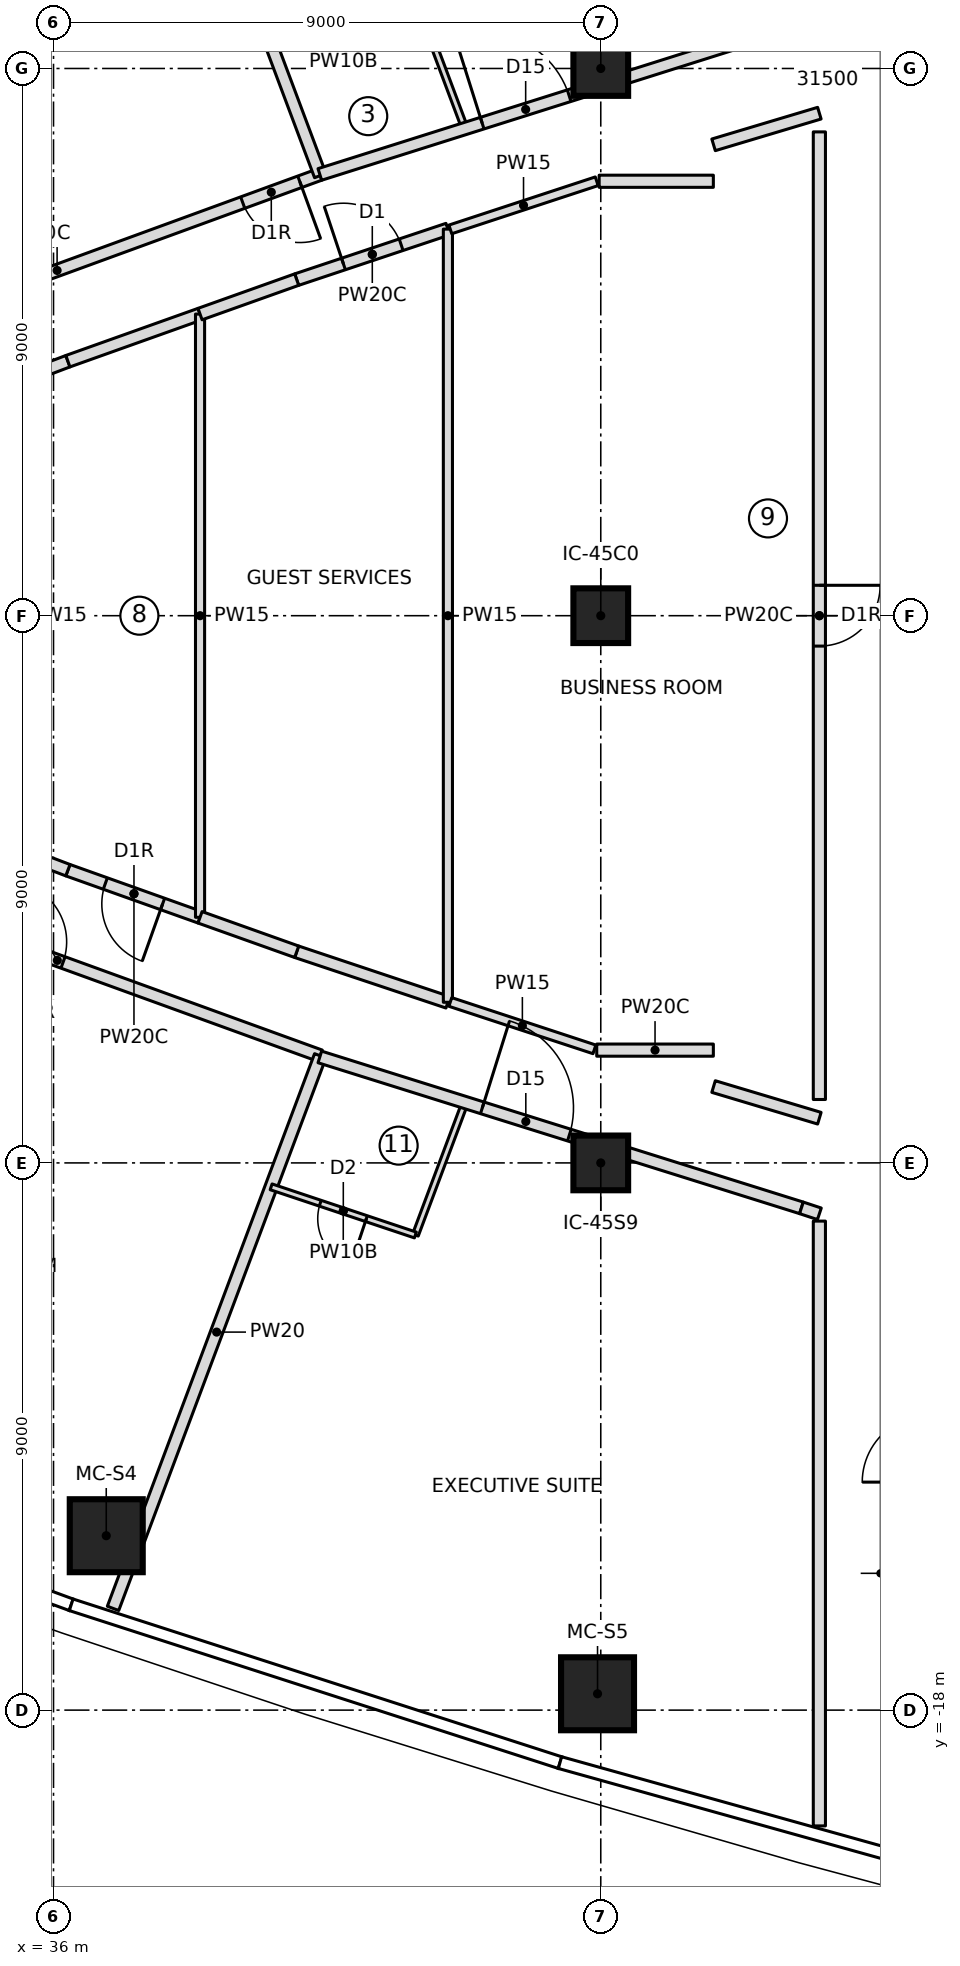
"""IFC4 building model, lengths in metres.
Left out: names, types, materials, properties, quantities, classifications, styles, units other than length and angle.
Written with IfcOpenShell. Run it as: python <this file> out.ifc"""

import sys

from ifc_helpers import new_model, si_unit, direction, frame, frame_2d, origin, origin_2d, place, context, subcontext, project, spatial, rectangle, extrude, element, fill, save


model = new_model("IFC4")
c1 = context("Model", 3, precision=1e-05, world=origin(), true_north=direction((0.0, 1.0)))
c2 = subcontext(c1, "Body", "Model", "MODEL_VIEW")
j1 = project(units=[si_unit("LENGTHUNIT", "METRE"), si_unit("PLANEANGLEUNIT", "RADIAN")], contexts=[c1])
p1 = place(None, origin())
s1 = spatial("IfcSite", under=j1, at=p1, CompositionType="ELEMENT")
p2 = place(p1, origin())
s2 = spatial("IfcBuilding", under=s1, at=p2, CompositionType="ELEMENT")
p3 = place(p2, frame((0.0, 0.0, 238.55)))
s3 = spatial("IfcBuildingStorey", under=s2, at=p3, CompositionType="ELEMENT", Elevation=238.55)
for number, where, z_axis, x_axis in (
    (1, (36.867, -15.132, 0.0), (0.0, 0.0, 1.0), (1.0, 0.0, 0.0)),
    (2, (44.947, -17.731, 0.0), (0.0, 0.0, 1.0), (1.0, 0.0, 0.0)),
):
    element("IfcColumn", number, at=place(p3, frame(where, z_axis=z_axis, x_axis=x_axis)), inside=s3, PredefinedType="COLUMN", context=c2, shape_type="SweptSolid", body=[
        extrude(rectangle(XDim=1.2, YDim=1.2, at=origin_2d()), origin(), (0.0, 0.0, 1.0), 3.55),
    ])
for number, where, z_axis, x_axis in (
    (3, (45.0, -9.0, 0.0), (0.0, 0.0, 1.0), (1.0, 0.0, 0.0)),
    (4, (45.0, 0.0, 0.0), (0.0, 0.0, 1.0), (1.0, 0.0, 0.0)),
    (5, (45.0, 9.0, 0.0), (0.0, 0.0, 1.0), (1.0, 0.0, 0.0)),
):
    element("IfcColumn", number, at=place(p3, frame(where, z_axis=z_axis, x_axis=x_axis)), inside=s3, PredefinedType="COLUMN", context=c2, shape_type="SweptSolid", body=[
        extrude(rectangle(XDim=0.9, YDim=0.9, at=origin_2d()), origin(), (0.0, 0.0, 1.0), 3.55),
    ])
p4 = place(p3, frame((40.38, 7.257, 0.0), z_axis=(0.0, 0.0, 1.0), x_axis=(-0.939266239759, -0.343189351305, 0.0)))
e6 = element("IfcWall", 6, at=p4, inside=s3, PredefinedType="PARTITIONING", context=c2, shape_type="SweptSolid", body=[
    extrude(rectangle(XDim=9.2, YDim=0.2, at=frame_2d((4.6, 0.0))), origin(), (0.0, 0.0, 1.0), 3.25),
])
p5 = place(p4, frame((0.35, 0.0, 0.0)))
e7 = element("IfcOpeningElement", 7, at=p5, cuts=e6, PredefinedType="OPENING", context=c2, shape_type="SweptSolid", body=[
    extrude(rectangle(XDim=1.0, YDim=2.1, at=frame_2d((0.5, 1.05))), frame((0.0, 0.11, 0.0), z_axis=(0.0, -1.0, 0.0), x_axis=(1.0, 0.0, 0.0)), (0.0, 0.0, 1.0), 0.22),
])
p6 = place(p3, frame((40.387, 7.238, 0.0), z_axis=(0.0, 0.0, 1.0), x_axis=(-0.351098633881, 0.936338480084, 0.0)))
e8 = element("IfcWall", 8, at=p6, inside=s3, PredefinedType="PARTITIONING", context=c2, shape_type="SweptSolid", body=[
    extrude(rectangle(XDim=9.707, YDim=0.2, at=frame_2d((4.853, 0.0))), origin(), (0.0, 0.0, 1.0), 3.25),
])
p7 = place(p3, frame((41.951, 10.186, 0.0), z_axis=(0.0, 0.0, 1.0), x_axis=(0.351146927505, -0.936320370014, 0.0)))
e9 = element("IfcWall", 9, at=p7, inside=s3, PredefinedType="PARTITIONING", context=c2, shape_type="SweptSolid", body=[
    extrude(rectangle(XDim=2.278, YDim=0.1, at=frame_2d((1.139, 0.0))), origin(), (0.0, 0.0, 1.0), 3.25),
])
p8 = place(p3, frame((31.738, -4.1, 0.0), z_axis=(0.0, 0.0, 1.0), x_axis=(0.940010170527, -0.341146419159, 0.0)))
e10 = element("IfcWall", 10, at=p8, inside=s3, PredefinedType="PARTITIONING", context=c2, shape_type="SweptSolid", body=[
    extrude(rectangle(XDim=9.2, YDim=0.2, at=frame_2d((4.6, 0.0))), origin(), (0.0, 0.0, 1.0), 3.25),
])
p9 = place(p8, frame((3.7, 0.0, 0.0)))
e11 = element("IfcOpeningElement", 11, at=p9, cuts=e10, PredefinedType="OPENING", context=c2, shape_type="SweptSolid", body=[
    extrude(rectangle(XDim=1.0, YDim=2.1, at=frame_2d((0.5, 1.05))), frame((0.0, 0.11, 0.0), z_axis=(0.0, -1.0, 0.0), x_axis=(1.0, 0.0, 0.0)), (0.0, 0.0, 1.0), 0.22),
])
p10 = place(p3, frame((36.979, -16.327, 0.0), z_axis=(0.0, 0.0, 1.0), x_axis=(0.351098633881, 0.936338480084, 0.0)))
e12 = element("IfcWall", 12, at=p10, inside=s3, PredefinedType="PARTITIONING", context=c2, shape_type="SweptSolid", body=[
    extrude(rectangle(XDim=9.707, YDim=0.2, at=frame_2d((4.853, 0.0))), origin(), (0.0, 0.0, 1.0), 3.25),
])
p11 = place(p3, frame((42.751, -8.052, 0.0), z_axis=(0.0, 0.0, 1.0), x_axis=(-0.351146927505, -0.936320370014, 0.0)))
e13 = element("IfcWall", 13, at=p11, inside=s3, PredefinedType="PARTITIONING", context=c2, shape_type="SweptSolid", body=[
    extrude(rectangle(XDim=2.278, YDim=0.1, at=frame_2d((1.139, 0.0))), origin(), (0.0, 0.0, 1.0), 3.25),
])
p12 = place(p3, frame((41.951, -10.186, 0.0), z_axis=(0.0, 0.0, 1.0), x_axis=(-0.948468383404, 0.316871781141, 0.0)))
e14 = element("IfcWall", 14, at=p12, inside=s3, PredefinedType="PARTITIONING", context=c2, shape_type="SweptSolid", body=[
    extrude(rectangle(XDim=2.502, YDim=0.1, at=frame_2d((1.251, 0.0))), origin(), (0.0, 0.0, 1.0), 3.25),
])
p13 = place(p12, frame((0.85, 0.0, 0.0)))
e15 = element("IfcOpeningElement", 15, at=p13, cuts=e14, PredefinedType="OPENING", context=c2, shape_type="SweptSolid", body=[
    extrude(rectangle(XDim=0.8, YDim=2.1, at=frame_2d((0.4, 1.05))), frame((0.0, 0.06, 0.0), z_axis=(0.0, -1.0, 0.0), x_axis=(1.0, 0.0, 0.0)), (0.0, 0.0, 1.0), 0.12),
])
p14 = place(p3, frame((38.41, -4.961, 0.0), z_axis=(0.0, 0.0, 1.0), x_axis=(-0.941897392466, 0.335900732459, 0.0)))
e16 = element("IfcWall", 16, at=p14, inside=s3, PredefinedType="PARTITIONING", context=c2, shape_type="SweptSolid", body=[
    extrude(rectangle(XDim=2.308, YDim=0.2, at=frame_2d((1.154, 0.0))), origin(), (0.0, 0.0, 1.0), 3.25),
])
p15 = place(p14, frame((0.654, 0.0, 0.0)))
e17 = element("IfcOpeningElement", 17, at=p15, cuts=e16, PredefinedType="OPENING", context=c2, shape_type="SweptSolid", body=[
    extrude(rectangle(XDim=1.0, YDim=2.1, at=frame_2d((0.5, 1.05))), frame((0.0, 0.11, 0.0), z_axis=(0.0, -1.0, 0.0), x_axis=(1.0, 0.0, 0.0)), (0.0, 0.0, 1.0), 0.22),
])
for number, where, z_axis, x_axis in (
    (18, (36.236, -4.186, 0.0), (0.0, 0.0, 1.0), (-0.935, 0.355, 0.0)),
    (19, (35.41, 3.872, 0.0), (0.0, 0.0, 1.0), (0.935, 0.355, 0.0)),
):
    element("IfcWall", number, at=place(p3, frame(where, z_axis=z_axis, x_axis=x_axis)), inside=s3, PredefinedType="PARTITIONING", context=c2, shape_type="SweptSolid", body=[
        extrude(rectangle(XDim=0.884, YDim=0.2, at=frame_2d((0.442, 0.0))), origin(), (0.0, 0.0, 1.0), 3.25),
    ])
p16 = place(p3, frame((36.236, 4.186, 0.0), z_axis=(0.0, 0.0, 1.0), x_axis=(0.941897392466, 0.335900732459, 0.0)))
e20 = element("IfcWall", 20, at=p16, inside=s3, PredefinedType="PARTITIONING", context=c2, shape_type="SweptSolid", body=[
    extrude(rectangle(XDim=2.308, YDim=0.2, at=frame_2d((1.154, 0.0))), origin(), (0.0, 0.0, 1.0), 3.25),
])
p17 = place(p3, frame((38.41, -4.961, 0.0), z_axis=(0.0, 0.0, 1.0), x_axis=(0.0, 1.0, 0.0)))
e21 = element("IfcWall", 21, at=p17, inside=s3, PredefinedType="PARTITIONING", context=c2, shape_type="SweptSolid", body=[
    extrude(rectangle(XDim=9.921, YDim=0.15, at=frame_2d((4.961, 0.0))), origin(), (0.0, 0.0, 1.0), 3.25),
])
p18 = place(p3, frame((39.999, 5.527, 0.0), z_axis=(0.0, 0.0, 1.0), x_axis=(0.948459565489, 0.316898173918, 0.0)))
e22 = element("IfcWall", 22, at=p18, inside=s3, PredefinedType="PARTITIONING", context=c2, shape_type="SweptSolid", body=[
    extrude(rectangle(XDim=2.622, YDim=0.2, at=frame_2d((1.311, 0.0))), origin(), (0.0, 0.0, 1.0), 3.25),
])
p19 = place(p18, frame((0.811, 0.0, 0.0)))
e23 = element("IfcOpeningElement", 23, at=p19, cuts=e22, PredefinedType="OPENING", context=c2, shape_type="SweptSolid", body=[
    extrude(rectangle(XDim=1.0, YDim=2.1, at=frame_2d((0.5, 1.05))), frame((0.0, 0.11, 0.0), z_axis=(0.0, -1.0, 0.0), x_axis=(1.0, 0.0, 0.0)), (0.0, 0.0, 1.0), 0.22),
])
p20 = place(p3, frame((42.486, -6.358, 0.0), z_axis=(0.0, 0.0, 1.0), x_axis=(-0.948459565489, 0.316898173918, 0.0)))
e24 = element("IfcWall", 24, at=p20, inside=s3, PredefinedType="PARTITIONING", context=c2, shape_type="SweptSolid", body=[
    extrude(rectangle(XDim=2.622, YDim=0.2, at=frame_2d((1.311, 0.0))), origin(), (0.0, 0.0, 1.0), 3.25),
])
for number, where, z_axis, x_axis in (
    (25, (39.999, -5.527, 0.0), (0.0, 0.0, 1.0), (-0.942, 0.336, 0.0)),
    (26, (38.41, 4.961, 0.0), (0.0, 0.0, 1.0), (0.942, 0.336, 0.0)),
):
    element("IfcWall", number, at=place(p3, frame(where, z_axis=z_axis, x_axis=x_axis)), inside=s3, PredefinedType="PARTITIONING", context=c2, shape_type="SweptSolid", body=[
        extrude(rectangle(XDim=1.687, YDim=0.2, at=frame_2d((0.844, 0.0))), origin(), (0.0, 0.0, 1.0), 3.25),
    ])
p21 = place(p3, frame((42.486, -6.358, 0.0), z_axis=(0.0, 0.0, 1.0), x_axis=(0.0, 1.0, 0.0)))
e27 = element("IfcWall", 27, at=p21, inside=s3, PredefinedType="PARTITIONING", context=c2, shape_type="SweptSolid", body=[
    extrude(rectangle(XDim=12.716, YDim=0.15, at=frame_2d((6.358, 0.0))), origin(), (0.0, 0.0, 1.0), 3.25),
])
p22 = place(p3, frame((40.38, 7.257, 0.0), z_axis=(0.0, 0.0, 1.0), x_axis=(0.953536454425, 0.301277662768, 0.0)))
e28 = element("IfcWall", 28, at=p22, inside=s3, PredefinedType="PARTITIONING", context=c2, shape_type="SweptSolid", body=[
    extrude(rectangle(XDim=8.306, YDim=0.2, at=frame_2d((4.153, 0.0))), origin(), (0.0, 0.0, 1.0), 3.25),
])
p23 = place(p22, frame((2.8, 0.0, 0.0)))
e29 = element("IfcOpeningElement", 29, at=p23, cuts=e28, PredefinedType="OPENING", context=c2, shape_type="SweptSolid", body=[
    extrude(rectangle(XDim=1.5, YDim=2.1, at=frame_2d((0.75, 1.05))), frame((0.0, 0.11, 0.0), z_axis=(0.0, -1.0, 0.0), x_axis=(1.0, 0.0, 0.0)), (0.0, 0.0, 1.0), 0.22),
])
p24 = place(p3, frame((40.38, -7.257, 0.0), z_axis=(0.0, 0.0, 1.0), x_axis=(0.954235234728, -0.299057046068, 0.0)))
e30 = element("IfcWall", 30, at=p24, inside=s3, PredefinedType="PARTITIONING", context=c2, shape_type="SweptSolid", body=[
    extrude(rectangle(XDim=8.3, YDim=0.2, at=frame_2d((4.15, 0.0))), origin(), (0.0, 0.0, 1.0), 3.25),
])
p25 = place(p24, frame((2.8, 0.0, 0.0)))
e31 = element("IfcOpeningElement", 31, at=p25, cuts=e30, PredefinedType="OPENING", context=c2, shape_type="SweptSolid", body=[
    extrude(rectangle(XDim=1.5, YDim=2.1, at=frame_2d((0.75, 1.05))), frame((0.0, 0.11, 0.0), z_axis=(0.0, -1.0, 0.0), x_axis=(1.0, 0.0, 0.0)), (0.0, 0.0, 1.0), 0.22),
])
p26 = place(p3, frame((48.595, 7.957, 0.0), z_axis=(0.0, 0.0, 1.0), x_axis=(0.0, -1.0, 0.0)))
e32 = element("IfcWall", 32, at=p26, inside=s3, PredefinedType="PARTITIONING", context=c2, shape_type="SweptSolid", body=[
    extrude(rectangle(XDim=15.914, YDim=0.2, at=frame_2d((7.957, 0.0))), origin(), (0.0, 0.0, 1.0), 3.25),
])
p27 = place(p26, frame((7.457, 0.0, 0.0)))
e33 = element("IfcOpeningElement", 33, at=p27, cuts=e32, PredefinedType="OPENING", context=c2, shape_type="SweptSolid", body=[
    extrude(rectangle(XDim=1.0, YDim=2.1, at=frame_2d((0.5, 1.05))), frame((0.0, 0.11, 0.0), z_axis=(0.0, -1.0, 0.0), x_axis=(1.0, 0.0, 0.0)), (0.0, 0.0, 1.0), 0.22),
])
p28 = place(p3, frame((42.526, 6.353, 0.0), z_axis=(0.0, 0.0, 1.0), x_axis=(0.949956634582, 0.312381805511, 0.0)))
e34 = element("IfcWall", 34, at=p28, inside=s3, PredefinedType="PARTITIONING", context=c2, shape_type="SweptSolid", body=[
    extrude(rectangle(XDim=2.535, YDim=0.15, at=frame_2d((1.267, 0.0))), origin(), (0.0, 0.0, 1.0), 3.25),
])
p29 = place(p3, frame((44.973, 7.145, 0.0), z_axis=(0.0, 0.0, 1.0), x_axis=(0.999999991552, 0.0001299883, 0.0)))
e35 = element("IfcWall", 35, at=p29, inside=s3, PredefinedType="PARTITIONING", context=c2, shape_type="SweptSolid", body=[
    extrude(rectangle(XDim=1.878, YDim=0.2, at=frame_2d((0.939, 0.0))), origin(), (0.0, 0.0, 1.0), 3.25),
])
for number, where, z_axis, x_axis in (
    (36, (46.855, 7.744, 0.0), (0.0, 0.0, 1.0), (0.958, 0.287, 0.0)),
    (37, (48.595, -8.265, 0.0), (0.0, 0.0, 1.0), (-0.958, 0.287, 0.0)),
):
    element("IfcWall", number, at=place(p3, frame(where, z_axis=z_axis, x_axis=x_axis)), inside=s3, PredefinedType="PARTITIONING", context=c2, shape_type="SweptSolid", body=[
        extrude(rectangle(XDim=1.816, YDim=0.2, at=frame_2d((0.908, 0.0))), origin(), (0.0, 0.0, 1.0), 3.25),
    ])
p30 = place(p3, frame((46.852, -7.145, 0.0), z_axis=(0.0, 0.0, 1.0), x_axis=(-0.999999991898, 0.000127291241, 0.0)))
e38 = element("IfcWall", 38, at=p30, inside=s3, PredefinedType="PARTITIONING", context=c2, shape_type="SweptSolid", body=[
    extrude(rectangle(XDim=1.918, YDim=0.2, at=frame_2d((0.959, 0.0))), origin(), (0.0, 0.0, 1.0), 3.25),
])
p31 = place(p3, frame((44.896, -7.133, 0.0), z_axis=(0.0, 0.0, 1.0), x_axis=(-0.94991890936, 0.312496505006, 0.0)))
e39 = element("IfcWall", 39, at=p31, inside=s3, PredefinedType="PARTITIONING", context=c2, shape_type="SweptSolid", body=[
    extrude(rectangle(XDim=2.495, YDim=0.15, at=frame_2d((1.247, 0.0))), origin(), (0.0, 0.0, 1.0), 3.25),
])
p32 = place(p3, frame((48.3, -9.739, 0.0), z_axis=(0.0, 0.0, 1.0), x_axis=(0.949310105444, -0.314341094518, 0.0)))
e40 = element("IfcWall", 40, at=p32, inside=s3, PredefinedType="PARTITIONING", context=c2, shape_type="SweptSolid", body=[
    extrude(rectangle(XDim=0.311, YDim=0.2, at=frame_2d((0.155, 0.0))), origin(), (0.0, 0.0, 1.0), 3.25),
])
p33 = place(p3, frame((48.595, -9.957, 0.0), z_axis=(0.0, 0.0, 1.0), x_axis=(0.0, -1.0, 0.0)))
e41 = element("IfcWall", 41, at=p33, inside=s3, PredefinedType="PARTITIONING", context=c2, shape_type="SweptSolid", body=[
    extrude(rectangle(XDim=9.947, YDim=0.2, at=frame_2d((4.974, 0.0))), origin(), (0.0, 0.0, 1.0), 3.25),
])
p34 = place(p5, origin())
e42 = element("IfcDoor", 42, at=p34, inside=s3, OperationType="SINGLE_SWING_RIGHT", PredefinedType="DOOR", context=c2, shape_type="SweptSolid", body=[
    extrude(rectangle(XDim=1.0, YDim=2.1, at=frame_2d((0.5, 1.05))), frame((0.0, 0.025, 0.0), z_axis=(0.0, -1.0, 0.0), x_axis=(1.0, 0.0, 0.0)), (0.0, 0.0, 1.0), 0.05),
])
fill(e7, e42)
p35 = place(p23, origin())
e43 = element("IfcDoor", 43, at=p35, inside=s3, OperationType="DOUBLE_DOOR_SINGLE_SWING", PredefinedType="DOOR", context=c2, shape_type="SweptSolid", body=[
    extrude(rectangle(XDim=1.5, YDim=2.1, at=frame_2d((0.75, 1.05))), frame((0.0, 0.025, 0.0), z_axis=(0.0, -1.0, 0.0), x_axis=(1.0, 0.0, 0.0)), (0.0, 0.0, 1.0), 0.05),
])
fill(e29, e43)
p36 = place(p9, origin())
e44 = element("IfcDoor", 44, at=p36, inside=s3, OperationType="SINGLE_SWING_RIGHT", PredefinedType="DOOR", context=c2, shape_type="SweptSolid", body=[
    extrude(rectangle(XDim=1.0, YDim=2.1, at=frame_2d((0.5, 1.05))), frame((0.0, 0.025, 0.0), z_axis=(0.0, -1.0, 0.0), x_axis=(1.0, 0.0, 0.0)), (0.0, 0.0, 1.0), 0.05),
])
fill(e11, e44)
p37 = place(p13, origin())
e45 = element("IfcDoor", 45, at=p37, inside=s3, OperationType="SINGLE_SWING_LEFT", PredefinedType="DOOR", context=c2, shape_type="SweptSolid", body=[
    extrude(rectangle(XDim=0.8, YDim=2.1, at=frame_2d((0.4, 1.05))), frame((0.0, 0.025, 0.0), z_axis=(0.0, -1.0, 0.0), x_axis=(1.0, 0.0, 0.0)), (0.0, 0.0, 1.0), 0.05),
])
fill(e15, e45)
p38 = place(p25, origin())
e46 = element("IfcDoor", 46, at=p38, inside=s3, OperationType="DOUBLE_DOOR_SINGLE_SWING", PredefinedType="DOOR", context=c2, shape_type="SweptSolid", body=[
    extrude(rectangle(XDim=1.5, YDim=2.1, at=frame_2d((0.75, 1.05))), frame((0.0, 0.025, 0.0), z_axis=(0.0, -1.0, 0.0), x_axis=(1.0, 0.0, 0.0)), (0.0, 0.0, 1.0), 0.05),
])
fill(e31, e46)
p39 = place(p15, origin())
e47 = element("IfcDoor", 47, at=p39, inside=s3, OperationType="SINGLE_SWING_RIGHT", PredefinedType="DOOR", context=c2, shape_type="SweptSolid", body=[
    extrude(rectangle(XDim=1.0, YDim=2.1, at=frame_2d((0.5, 1.05))), frame((0.0, 0.025, 0.0), z_axis=(0.0, -1.0, 0.0), x_axis=(1.0, 0.0, 0.0)), (0.0, 0.0, 1.0), 0.05),
])
fill(e17, e47)
p40 = place(p19, origin())
e48 = element("IfcDoor", 48, at=p40, inside=s3, OperationType="SINGLE_SWING_LEFT", PredefinedType="DOOR", context=c2, shape_type="SweptSolid", body=[
    extrude(rectangle(XDim=1.0, YDim=2.1, at=frame_2d((0.5, 1.05))), frame((0.0, 0.025, 0.0), z_axis=(0.0, -1.0, 0.0), x_axis=(1.0, 0.0, 0.0)), (0.0, 0.0, 1.0), 0.05),
])
fill(e23, e48)
p41 = place(p27, origin())
e49 = element("IfcDoor", 49, at=p41, inside=s3, OperationType="SINGLE_SWING_RIGHT", PredefinedType="DOOR", context=c2, shape_type="SweptSolid", body=[
    extrude(rectangle(XDim=1.0, YDim=2.1, at=frame_2d((0.5, 1.05))), frame((0.0, 0.025, 0.0), z_axis=(0.0, -1.0, 0.0), x_axis=(1.0, 0.0, 0.0)), (0.0, 0.0, 1.0), 0.05),
])
fill(e33, e49)
save(model, sys.argv[1])
